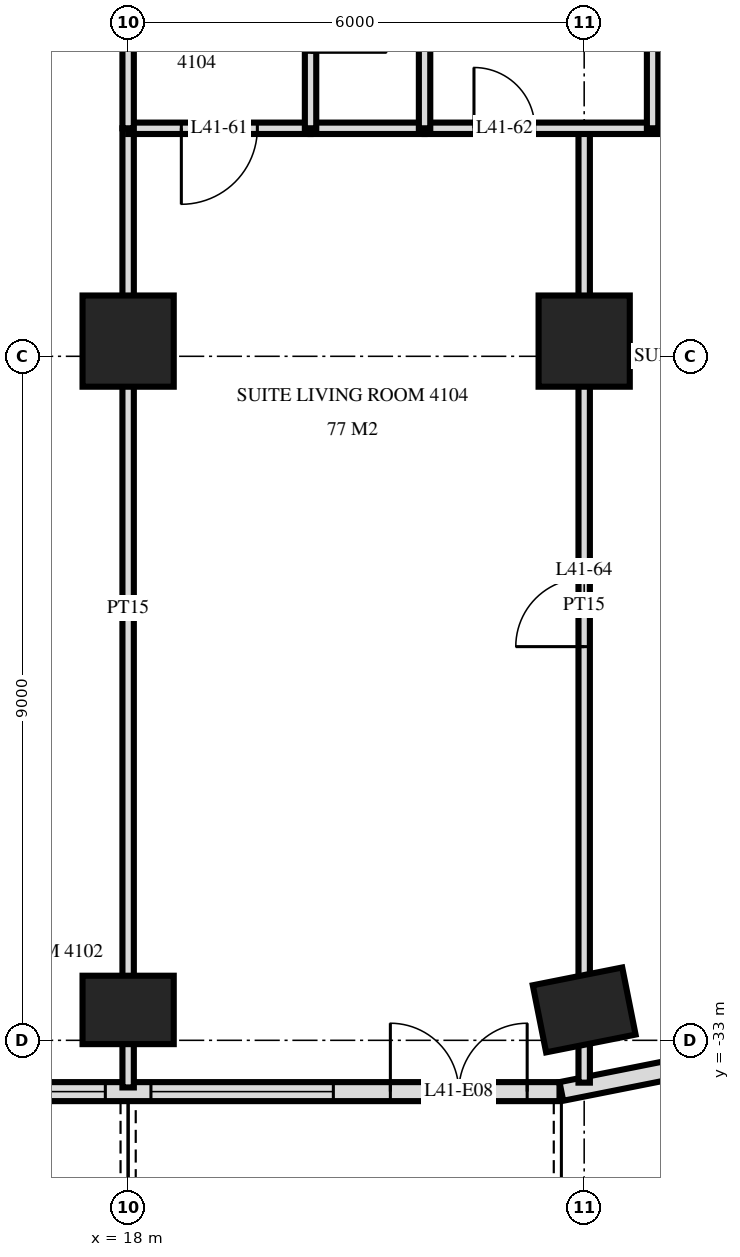
"""IFC4 building model, lengths in metres.
Left out: names, types, materials, properties, quantities, classifications, styles, units other than length and angle.
Written with IfcOpenShell. Run it as: python <this file> out.ifc"""

import sys

from ifc_helpers import new_model, si_unit, direction, frame, frame_2d, origin, origin_2d, place, context, subcontext, project, spatial, rectangle, extrude, element, fill, save


model = new_model("IFC4")
c1 = context("Model", 3, precision=1e-05, world=origin(), true_north=direction((0.0, 1.0)))
c2 = subcontext(c1, "Body", "Model", "MODEL_VIEW")
j1 = project(units=[si_unit("LENGTHUNIT", "METRE"), si_unit("PLANEANGLEUNIT", "RADIAN")], contexts=[c1])
p1 = place(None, origin())
s1 = spatial("IfcSite", under=j1, at=p1, CompositionType="ELEMENT")
p2 = place(p1, origin())
s2 = spatial("IfcBuilding", under=s1, at=p2, CompositionType="ELEMENT")
p3 = place(p2, frame((0.0, 0.0, 159.6)))
s3 = spatial("IfcBuildingStorey", under=s2, at=p3, CompositionType="ELEMENT", Elevation=159.6)
p4 = place(p3, frame((18.0, -32.6, 0.0), z_axis=(0.0, 0.0, 1.0), x_axis=(1.0, 0.0, 0.0)))
e1 = element("IfcColumn", 1, at=p4, inside=s3, PredefinedType="COLUMN", context=c2, shape_type="SweptSolid", body=[
    extrude(rectangle(XDim=1.2, YDim=0.9, at=origin_2d()), origin(), (0.0, 0.0, 1.0), 3.6),
])
p5 = place(p3, frame((18.0, -23.8, 0.0), z_axis=(0.0, 0.0, 1.0), x_axis=(1.0, 0.0, 0.0)))
e2 = element("IfcColumn", 2, at=p5, inside=s3, PredefinedType="COLUMN", context=c2, shape_type="SweptSolid", body=[
    extrude(rectangle(XDim=1.2, YDim=1.2, at=origin_2d()), origin(), (0.0, 0.0, 1.0), 3.6),
])
p6 = place(p3, frame((24.0, -32.6, 0.0), z_axis=(0.0, 0.0, 1.0), x_axis=(0.980792089743, 0.195056086032, 0.0)))
e3 = element("IfcColumn", 3, at=p6, inside=s3, PredefinedType="COLUMN", context=c2, shape_type="SweptSolid", body=[
    extrude(rectangle(XDim=1.2, YDim=0.9, at=origin_2d()), origin(), (0.0, 0.0, 1.0), 3.6),
])
p7 = place(p3, frame((24.0, -23.8, 0.0), z_axis=(0.0, 0.0, 1.0), x_axis=(1.0, 0.0, 0.0)))
e4 = element("IfcColumn", 4, at=p7, inside=s3, PredefinedType="COLUMN", context=c2, shape_type="SweptSolid", body=[
    extrude(rectangle(XDim=1.2, YDim=1.2, at=origin_2d()), origin(), (0.0, 0.0, 1.0), 3.6),
])
p8 = place(p3, frame((-23.675, -33.675, 0.0), z_axis=(0.0, 0.0, 1.0), x_axis=(1.0, 0.0, 0.0)))
e5 = element("IfcWall", 5, at=p8, inside=s3, PredefinedType="SOLIDWALL", context=c2, shape_type="SweptSolid", body=[
    extrude(rectangle(XDim=47.351, YDim=0.25, at=frame_2d((23.675, 0.0))), origin(), (0.0, 0.0, 1.0), 3.32),
])
p9 = place(p8, frame((0.575, 0.0, 0.0)))
e6 = element("IfcOpeningElement", 6, at=p9, cuts=e5, PredefinedType="OPENING", context=c2, shape_type="SweptSolid", body=[
    extrude(rectangle(XDim=1.8, YDim=2.4, at=frame_2d((0.9, 1.2))), frame((0.0, 0.135, 0.0), z_axis=(0.0, -1.0, 0.0), x_axis=(1.0, 0.0, 0.0)), (0.0, 0.0, 1.0), 0.27),
])
p10 = place(p8, frame((3.425, 0.0, 0.3)))
e7 = element("IfcOpeningElement", 7, at=p10, cuts=e5, PredefinedType="OPENING", context=c2, shape_type="SweptSolid", body=[
    extrude(rectangle(XDim=1.8, YDim=2.1, at=frame_2d((0.9, 1.05))), frame((0.0, 0.135, 0.0), z_axis=(0.0, -1.0, 0.0), x_axis=(1.0, 0.0, 0.0)), (0.0, 0.0, 1.0), 0.27),
])
p11 = place(p8, frame((5.975, 0.0, 0.3)))
e8 = element("IfcOpeningElement", 8, at=p11, cuts=e5, PredefinedType="OPENING", context=c2, shape_type="SweptSolid", body=[
    extrude(rectangle(XDim=2.4, YDim=2.1, at=frame_2d((1.2, 1.05))), frame((0.0, 0.135, 0.0), z_axis=(0.0, -1.0, 0.0), x_axis=(1.0, 0.0, 0.0)), (0.0, 0.0, 1.0), 0.27),
])
p12 = place(p8, frame((9.275, 0.0, 0.0)))
e9 = element("IfcOpeningElement", 9, at=p12, cuts=e5, PredefinedType="OPENING", context=c2, shape_type="SweptSolid", body=[
    extrude(rectangle(XDim=1.8, YDim=2.4, at=frame_2d((0.9, 1.2))), frame((0.0, 0.135, 0.0), z_axis=(0.0, -1.0, 0.0), x_axis=(1.0, 0.0, 0.0)), (0.0, 0.0, 1.0), 0.27),
])
p13 = place(p8, frame((12.275, 0.0, 0.0)))
e10 = element("IfcOpeningElement", 10, at=p13, cuts=e5, PredefinedType="OPENING", context=c2, shape_type="SweptSolid", body=[
    extrude(rectangle(XDim=1.8, YDim=2.4, at=frame_2d((0.9, 1.2))), frame((0.0, 0.135, 0.0), z_axis=(0.0, -1.0, 0.0), x_axis=(1.0, 0.0, 0.0)), (0.0, 0.0, 1.0), 0.27),
])
p14 = place(p8, frame((14.975, 0.0, 0.3)))
e11 = element("IfcOpeningElement", 11, at=p14, cuts=e5, PredefinedType="OPENING", context=c2, shape_type="SweptSolid", body=[
    extrude(rectangle(XDim=2.4, YDim=2.1, at=frame_2d((1.2, 1.05))), frame((0.0, 0.135, 0.0), z_axis=(0.0, -1.0, 0.0), x_axis=(1.0, 0.0, 0.0)), (0.0, 0.0, 1.0), 0.27),
])
p15 = place(p8, frame((17.975, 0.0, 0.3)))
e12 = element("IfcOpeningElement", 12, at=p15, cuts=e5, PredefinedType="OPENING", context=c2, shape_type="SweptSolid", body=[
    extrude(rectangle(XDim=2.4, YDim=2.1, at=frame_2d((1.2, 1.05))), frame((0.0, 0.135, 0.0), z_axis=(0.0, -1.0, 0.0), x_axis=(1.0, 0.0, 0.0)), (0.0, 0.0, 1.0), 0.27),
])
p16 = place(p8, frame((21.275, 0.0, 0.0)))
e13 = element("IfcOpeningElement", 13, at=p16, cuts=e5, PredefinedType="OPENING", context=c2, shape_type="SweptSolid", body=[
    extrude(rectangle(XDim=1.8, YDim=2.4, at=frame_2d((0.9, 1.2))), frame((0.0, 0.135, 0.0), z_axis=(0.0, -1.0, 0.0), x_axis=(1.0, 0.0, 0.0)), (0.0, 0.0, 1.0), 0.27),
])
p17 = place(p8, frame((24.275, 0.0, 0.0)))
e14 = element("IfcOpeningElement", 14, at=p17, cuts=e5, PredefinedType="OPENING", context=c2, shape_type="SweptSolid", body=[
    extrude(rectangle(XDim=1.8, YDim=2.4, at=frame_2d((0.9, 1.2))), frame((0.0, 0.135, 0.0), z_axis=(0.0, -1.0, 0.0), x_axis=(1.0, 0.0, 0.0)), (0.0, 0.0, 1.0), 0.27),
])
p18 = place(p8, frame((26.975, 0.0, 0.3)))
e15 = element("IfcOpeningElement", 15, at=p18, cuts=e5, PredefinedType="OPENING", context=c2, shape_type="SweptSolid", body=[
    extrude(rectangle(XDim=2.4, YDim=2.1, at=frame_2d((1.2, 1.05))), frame((0.0, 0.135, 0.0), z_axis=(0.0, -1.0, 0.0), x_axis=(1.0, 0.0, 0.0)), (0.0, 0.0, 1.0), 0.27),
])
p19 = place(p8, frame((30.275, 0.0, 0.0)))
e16 = element("IfcOpeningElement", 16, at=p19, cuts=e5, PredefinedType="OPENING", context=c2, shape_type="SweptSolid", body=[
    extrude(rectangle(XDim=1.8, YDim=2.4, at=frame_2d((0.9, 1.2))), frame((0.0, 0.135, 0.0), z_axis=(0.0, -1.0, 0.0), x_axis=(1.0, 0.0, 0.0)), (0.0, 0.0, 1.0), 0.27),
])
p20 = place(p8, frame((32.975, 0.0, 0.3)))
e17 = element("IfcOpeningElement", 17, at=p20, cuts=e5, PredefinedType="OPENING", context=c2, shape_type="SweptSolid", body=[
    extrude(rectangle(XDim=2.4, YDim=2.1, at=frame_2d((1.2, 1.05))), frame((0.0, 0.135, 0.0), z_axis=(0.0, -1.0, 0.0), x_axis=(1.0, 0.0, 0.0)), (0.0, 0.0, 1.0), 0.27),
])
p21 = place(p8, frame((36.275, 0.0, 0.0)))
e18 = element("IfcOpeningElement", 18, at=p21, cuts=e5, PredefinedType="OPENING", context=c2, shape_type="SweptSolid", body=[
    extrude(rectangle(XDim=1.8, YDim=2.4, at=frame_2d((0.9, 1.2))), frame((0.0, 0.135, 0.0), z_axis=(0.0, -1.0, 0.0), x_axis=(1.0, 0.0, 0.0)), (0.0, 0.0, 1.0), 0.27),
])
p22 = place(p8, frame((38.975, 0.0, 0.3)))
e19 = element("IfcOpeningElement", 19, at=p22, cuts=e5, PredefinedType="OPENING", context=c2, shape_type="SweptSolid", body=[
    extrude(rectangle(XDim=2.4, YDim=2.1, at=frame_2d((1.2, 1.05))), frame((0.0, 0.135, 0.0), z_axis=(0.0, -1.0, 0.0), x_axis=(1.0, 0.0, 0.0)), (0.0, 0.0, 1.0), 0.27),
])
p23 = place(p8, frame((41.975, 0.0, 0.3)))
e20 = element("IfcOpeningElement", 20, at=p23, cuts=e5, PredefinedType="OPENING", context=c2, shape_type="SweptSolid", body=[
    extrude(rectangle(XDim=2.4, YDim=2.1, at=frame_2d((1.2, 1.05))), frame((0.0, 0.135, 0.0), z_axis=(0.0, -1.0, 0.0), x_axis=(1.0, 0.0, 0.0)), (0.0, 0.0, 1.0), 0.27),
])
p24 = place(p8, frame((45.125, 0.0, 0.0)))
e21 = element("IfcOpeningElement", 21, at=p24, cuts=e5, PredefinedType="OPENING", context=c2, shape_type="SweptSolid", body=[
    extrude(rectangle(XDim=1.8, YDim=2.4, at=frame_2d((0.9, 1.2))), frame((0.0, 0.135, 0.0), z_axis=(0.0, -1.0, 0.0), x_axis=(1.0, 0.0, 0.0)), (0.0, 0.0, 1.0), 0.27),
])
p25 = place(p3, frame((23.7, -33.673, 0.0), z_axis=(0.0, 0.0, 1.0), x_axis=(0.980775640221, 0.19513878023, 0.0)))
e22 = element("IfcWall", 22, at=p25, inside=s3, PredefinedType="SOLIDWALL", context=c2, shape_type="SweptSolid", body=[
    extrude(rectangle(XDim=1.681, YDim=0.25, at=frame_2d((0.841, 0.0))), origin(), (0.0, 0.0, 1.0), 3.32),
])
p26 = place(p3, frame((24.9, -21.0, 0.0), z_axis=(0.0, 0.0, 1.0), x_axis=(0.0, 1.0, 0.0)))
e23 = element("IfcWall", 23, at=p26, inside=s3, PredefinedType="PARTITIONING", context=c2, shape_type="SweptSolid", body=[
    extrude(rectangle(XDim=3.0, YDim=0.15, at=frame_2d((1.5, 0.0))), origin(), (0.0, 0.0, 1.0), 3.32),
])
p27 = place(p3, frame((24.0, -33.557, 0.0), z_axis=(0.0, 0.0, 1.0), x_axis=(0.0, 1.0, 0.0)))
e24 = element("IfcWall", 24, at=p27, inside=s3, PredefinedType="PARTITIONING", context=c2, shape_type="SweptSolid", body=[
    extrude(rectangle(XDim=12.557, YDim=0.15, at=frame_2d((6.278, 0.0))), origin(), (0.0, 0.0, 1.0), 3.32),
])
p28 = place(p27, frame((5.737, 0.0, 0.0)))
e25 = element("IfcOpeningElement", 25, at=p28, cuts=e24, PredefinedType="OPENING", context=c2, shape_type="SweptSolid", body=[
    extrude(rectangle(XDim=0.9, YDim=2.1, at=frame_2d((0.45, 1.05))), frame((0.0, 0.085, 0.0), z_axis=(0.0, -1.0, 0.0), x_axis=(1.0, 0.0, 0.0)), (0.0, 0.0, 1.0), 0.17),
])
p29 = place(p3, frame((21.9, -21.0, 0.0), z_axis=(0.0, 0.0, 1.0), x_axis=(0.0, 1.0, 0.0)))
e26 = element("IfcWall", 26, at=p29, inside=s3, PredefinedType="PLUMBINGWALL", context=c2, shape_type="SweptSolid", body=[
    extrude(rectangle(XDim=3.0, YDim=0.15, at=frame_2d((1.5, 0.0))), origin(), (0.0, 0.0, 1.0), 3.32),
])
p30 = place(p3, frame((20.4, -21.0, 0.0), z_axis=(0.0, 0.0, 1.0), x_axis=(0.0, 1.0, 0.0)))
e27 = element("IfcWall", 27, at=p30, inside=s3, PredefinedType="PARTITIONING", context=c2, shape_type="SweptSolid", body=[
    extrude(rectangle(XDim=3.0, YDim=0.15, at=frame_2d((1.5, 0.0))), origin(), (0.0, 0.0, 1.0), 3.32),
])
p31 = place(p30, frame((1.0, 0.0, 0.0)))
e28 = element("IfcOpeningElement", 28, at=p31, cuts=e27, PredefinedType="OPENING", context=c2, shape_type="SweptSolid", body=[
    extrude(rectangle(XDim=1.0, YDim=2.1, at=frame_2d((0.5, 1.05))), frame((0.0, 0.085, 0.0), z_axis=(0.0, -1.0, 0.0), x_axis=(1.0, 0.0, 0.0)), (0.0, 0.0, 1.0), 0.17),
])
p32 = place(p3, frame((18.0, -21.0, 0.0), z_axis=(0.0, 0.0, 1.0), x_axis=(0.0, 1.0, 0.0)))
e29 = element("IfcWall", 29, at=p32, inside=s3, PredefinedType="PARTITIONING", context=c2, shape_type="SweptSolid", body=[
    extrude(rectangle(XDim=3.0, YDim=0.15, at=frame_2d((1.5, 0.0))), origin(), (0.0, 0.0, 1.0), 3.32),
])
p33 = place(p3, frame((18.0, -33.62, 0.0), z_axis=(0.0, 0.0, 1.0), x_axis=(0.0, 1.0, 0.0)))
e30 = element("IfcWall", 30, at=p33, inside=s3, PredefinedType="PARTITIONING", context=c2, shape_type="SweptSolid", body=[
    extrude(rectangle(XDim=12.62, YDim=0.15, at=frame_2d((6.31, 0.0))), origin(), (0.0, 0.0, 1.0), 3.32),
])
p34 = place(p3, frame((18.0, -21.0, 0.0), z_axis=(0.0, 0.0, 1.0), x_axis=(1.0, 0.0, 0.0)))
e31 = element("IfcWall", 31, at=p34, inside=s3, PredefinedType="PARTITIONING", context=c2, shape_type="SweptSolid", body=[
    extrude(rectangle(XDim=2.4, YDim=0.15, at=frame_2d((1.2, 0.0))), origin(), (0.0, 0.0, 1.0), 3.32),
])
p35 = place(p34, frame((0.7, 0.0, 0.0)))
e32 = element("IfcOpeningElement", 32, at=p35, cuts=e31, PredefinedType="OPENING", context=c2, shape_type="SweptSolid", body=[
    extrude(rectangle(XDim=1.0, YDim=2.1, at=frame_2d((0.5, 1.05))), frame((0.0, 0.085, 0.0), z_axis=(0.0, -1.0, 0.0), x_axis=(1.0, 0.0, 0.0)), (0.0, 0.0, 1.0), 0.17),
])
p36 = place(p3, frame((21.9, -21.0, 0.0), z_axis=(0.0, 0.0, 1.0), x_axis=(1.0, 0.0, 0.0)))
e33 = element("IfcWall", 33, at=p36, inside=s3, PredefinedType="PARTITIONING", context=c2, shape_type="SweptSolid", body=[
    extrude(rectangle(XDim=6.12, YDim=0.15, at=frame_2d((3.06, 0.0))), origin(), (0.0, 0.0, 1.0), 3.32),
])
p37 = place(p36, frame((0.65, 0.0, 0.0)))
e34 = element("IfcOpeningElement", 34, at=p37, cuts=e33, PredefinedType="OPENING", context=c2, shape_type="SweptSolid", body=[
    extrude(rectangle(XDim=0.8, YDim=2.1, at=frame_2d((0.4, 1.05))), frame((0.0, 0.085, 0.0), z_axis=(0.0, -1.0, 0.0), x_axis=(1.0, 0.0, 0.0)), (0.0, 0.0, 1.0), 0.17),
])
p38 = place(p36, frame((4.2, 0.0, 0.0)))
e35 = element("IfcOpeningElement", 35, at=p38, cuts=e33, PredefinedType="OPENING", context=c2, shape_type="SweptSolid", body=[
    extrude(rectangle(XDim=0.9, YDim=2.1, at=frame_2d((0.45, 1.05))), frame((0.0, 0.085, 0.0), z_axis=(0.0, -1.0, 0.0), x_axis=(1.0, 0.0, 0.0)), (0.0, 0.0, 1.0), 0.17),
])
p39 = place(p3, frame((20.4, -21.0, 0.0), z_axis=(0.0, 0.0, 1.0), x_axis=(1.0, 0.0, 0.0)))
e36 = element("IfcWall", 36, at=p39, inside=s3, PredefinedType="PLUMBINGWALL", context=c2, shape_type="SweptSolid", body=[
    extrude(rectangle(XDim=1.5, YDim=0.15, at=frame_2d((0.75, 0.0))), origin(), (0.0, 0.0, 1.0), 3.32),
])
p40 = place(p22, origin())
e37 = element("IfcWindow", 37, at=p40, inside=s3, PartitioningType="SINGLE_PANEL", PredefinedType="WINDOW", context=c2, shape_type="SweptSolid", body=[
    extrude(rectangle(XDim=2.4, YDim=2.1, at=frame_2d((1.2, 1.05))), frame((0.0, 0.03, 0.0), z_axis=(0.0, -1.0, 0.0), x_axis=(1.0, 0.0, 0.0)), (0.0, 0.0, 1.0), 0.06),
])
fill(e19, e37)
p41 = place(p23, origin())
e38 = element("IfcWindow", 38, at=p41, inside=s3, PartitioningType="SINGLE_PANEL", PredefinedType="WINDOW", context=c2, shape_type="SweptSolid", body=[
    extrude(rectangle(XDim=2.4, YDim=2.1, at=frame_2d((1.2, 1.05))), frame((0.0, 0.03, 0.0), z_axis=(0.0, -1.0, 0.0), x_axis=(1.0, 0.0, 0.0)), (0.0, 0.0, 1.0), 0.06),
])
fill(e20, e38)
p42 = place(p24, origin())
e39 = element("IfcDoor", 39, at=p42, inside=s3, OperationType="DOUBLE_DOOR_SINGLE_SWING", PredefinedType="DOOR", context=c2, shape_type="SweptSolid", body=[
    extrude(rectangle(XDim=1.8, YDim=2.4, at=frame_2d((0.9, 1.2))), frame((0.0, 0.025, 0.0), z_axis=(0.0, -1.0, 0.0), x_axis=(1.0, 0.0, 0.0)), (0.0, 0.0, 1.0), 0.05),
])
fill(e21, e39)
p43 = place(p35, frame((0.5, 0.0, 0.0), z_axis=(0.0, 0.0, 1.0), x_axis=(-1.0, 0.0, 0.0)))
e40 = element("IfcDoor", 40, at=p43, inside=s3, OperationType="SINGLE_SWING_LEFT", PredefinedType="DOOR", context=c2, shape_type="SweptSolid", body=[
    extrude(rectangle(XDim=1.0, YDim=2.1, at=frame_2d((0.0, 1.05))), frame((0.0, -0.025, 0.0), z_axis=(0.0, 1.0, 0.0), x_axis=(-1.0, 0.0, 0.0)), (0.0, 0.0, 1.0), 0.05),
])
fill(e32, e40)
p44 = place(p37, origin())
e41 = element("IfcDoor", 41, at=p44, inside=s3, OperationType="SINGLE_SWING_RIGHT", PredefinedType="DOOR", context=c2, shape_type="SweptSolid", body=[
    extrude(rectangle(XDim=0.8, YDim=2.1, at=frame_2d((0.4, 1.05))), frame((0.0, 0.025, 0.0), z_axis=(0.0, -1.0, 0.0), x_axis=(1.0, 0.0, 0.0)), (0.0, 0.0, 1.0), 0.05),
])
fill(e34, e41)
p45 = place(p28, origin())
e42 = element("IfcDoor", 42, at=p45, inside=s3, OperationType="SINGLE_SWING_RIGHT", PredefinedType="DOOR", context=c2, shape_type="SweptSolid", body=[
    extrude(rectangle(XDim=0.9, YDim=2.1, at=frame_2d((0.45, 1.05))), frame((0.0, 0.025, 0.0), z_axis=(0.0, -1.0, 0.0), x_axis=(1.0, 0.0, 0.0)), (0.0, 0.0, 1.0), 0.05),
])
fill(e25, e42)
save(model, sys.argv[1])
